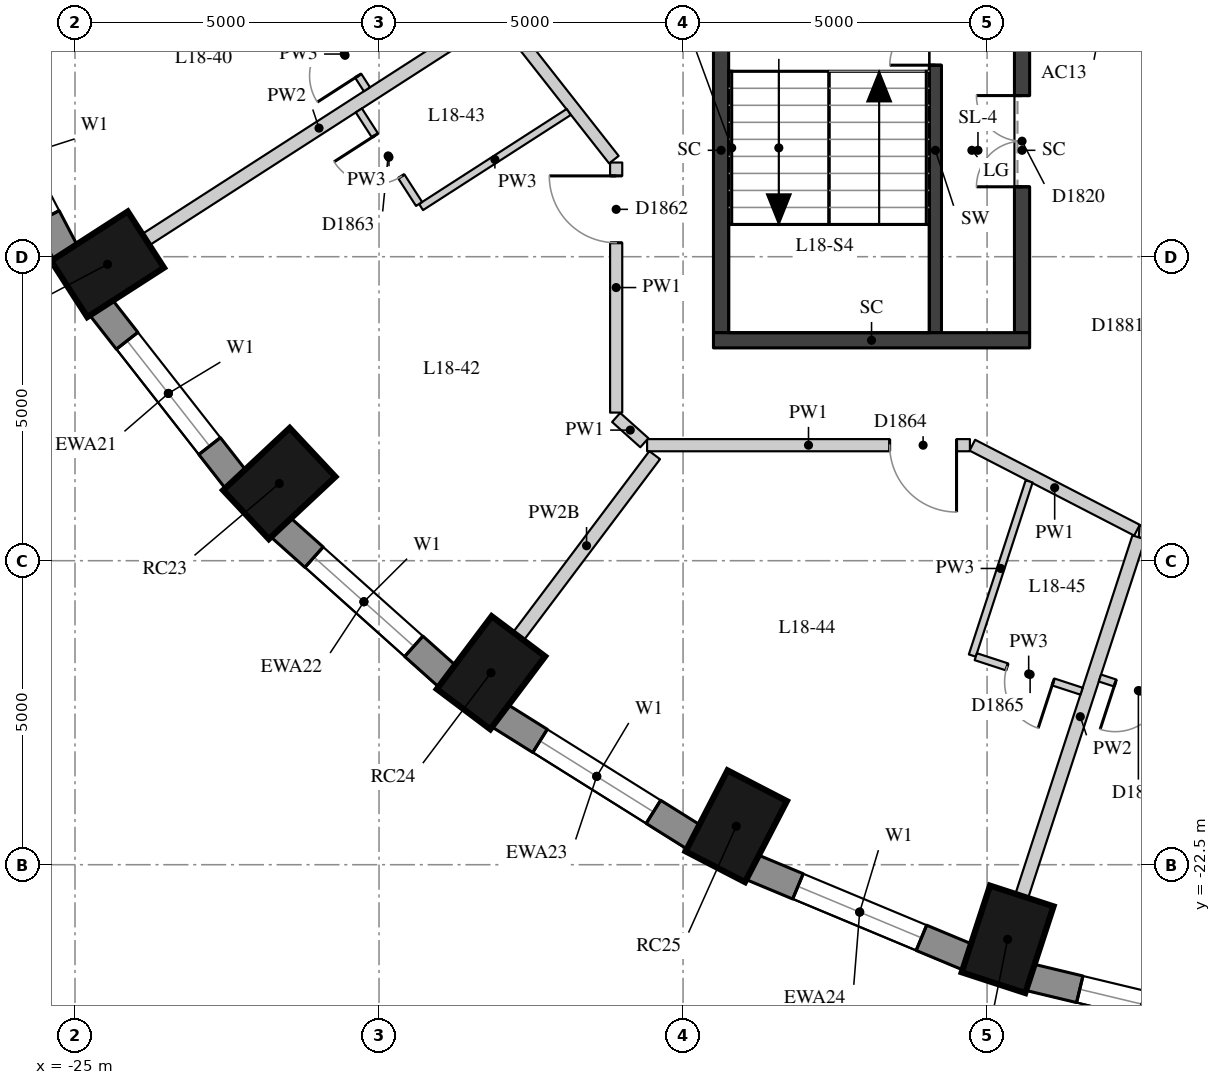
"""IFC4 building model, lengths in metres.
Left out: names, types, materials, properties, quantities, classifications, styles, units other than length and angle.
Written with IfcOpenShell. Run it as: python <this file> out.ifc"""

import sys

from ifc_helpers import new_model, si_unit, direction, frame, frame_2d, origin, origin_2d, place, context, subcontext, project, spatial, rectangle, extrude, element, fill, save


model = new_model("IFC4")
c1 = context("Model", 3, precision=1e-05, world=origin(), true_north=direction((0.0, 1.0)))
c2 = subcontext(c1, "Body", "Model", "MODEL_VIEW")
j1 = project(units=[si_unit("LENGTHUNIT", "METRE"), si_unit("PLANEANGLEUNIT", "RADIAN")], contexts=[c1])
p1 = place(None, origin())
s1 = spatial("IfcSite", under=j1, at=p1, CompositionType="ELEMENT")
p2 = place(p1, origin())
s2 = spatial("IfcBuilding", under=s1, at=p2, CompositionType="ELEMENT")
p3 = place(p2, frame((0.0, 0.0, 67.9)))
s3 = spatial("IfcBuildingStorey", under=s2, at=p3, CompositionType="ELEMENT", Elevation=67.9)
for number, where, z_axis, x_axis in (
    (1, (-24.465, -12.625, 0.0), (0.0, 0.0, 1.0), (-0.841, -0.541, 0.0)),
    (2, (-21.641, -16.23, 0.0), (0.0, 0.0, 1.0), (-0.73, -0.683, 0.0)),
    (3, (-18.159, -19.343, 0.0), (0.0, 0.0, 1.0), (-0.601, -0.799, 0.0)),
    (4, (-14.125, -21.867, 0.0), (0.0, 0.0, 1.0), (-0.46, -0.888, 0.0)),
    (5, (-9.662, -23.727, 0.0), (0.0, 0.0, 1.0), (-0.31, -0.951, 0.0)),
):
    element("IfcColumn", number, at=place(p3, frame(where, z_axis=z_axis, x_axis=x_axis)), inside=s3, PredefinedType="COLUMN", context=c2, shape_type="SweptSolid", body=[
        extrude(rectangle(XDim=1.5, YDim=1.1, at=origin_2d()), origin(), (0.0, 0.0, 1.0), 3.3),
    ])
p4 = place(p3, frame((-26.786, -9.305, 0.0), z_axis=(0.0, 0.0, 1.0), x_axis=(0.462492775226, -0.886623050041, 0.0)))
e6 = element("IfcWall", 6, at=p4, inside=s3, PredefinedType="SOLIDWALL", context=c2, shape_type="SweptSolid", body=[
    extrude(rectangle(XDim=3.532, YDim=0.45, at=frame_2d((1.766, 0.0))), origin(), (0.0, 0.0, 1.0), 3.02),
])
p5 = place(p4, frame((0.666, 0.0, 0.4)))
e7 = element("IfcOpeningElement", 7, at=p5, cuts=e6, PredefinedType="OPENING", context=c2, shape_type="SweptSolid", body=[
    extrude(rectangle(XDim=2.2, YDim=1.75, at=frame_2d((1.1, 0.875))), frame((0.0, 0.235, 0.0), z_axis=(0.0, -1.0, 0.0), x_axis=(1.0, 0.0, 0.0)), (0.0, 0.0, 1.0), 0.47),
])
p6 = place(p3, frame((-24.578, -13.328, 0.0), z_axis=(0.0, 0.0, 1.0), x_axis=(0.616661975264, -0.787228053529, 0.0)))
e8 = element("IfcWall", 8, at=p6, inside=s3, PredefinedType="SOLIDWALL", context=c2, shape_type="SweptSolid", body=[
    extrude(rectangle(XDim=3.61, YDim=0.45, at=frame_2d((1.805, 0.0))), origin(), (0.0, 0.0, 1.0), 3.02),
])
p7 = place(p6, frame((0.705, 0.0, 0.4)))
e9 = element("IfcOpeningElement", 9, at=p7, cuts=e8, PredefinedType="OPENING", context=c2, shape_type="SweptSolid", body=[
    extrude(rectangle(XDim=2.2, YDim=1.75, at=frame_2d((1.1, 0.875))), frame((0.0, 0.235, 0.0), z_axis=(0.0, -1.0, 0.0), x_axis=(1.0, 0.0, 0.0)), (0.0, 0.0, 1.0), 0.47),
])
p8 = place(p3, frame((-21.627, -16.943, 0.0), z_axis=(0.0, 0.0, 1.0), x_axis=(0.745526233716, -0.66647628228, 0.0)))
e10 = element("IfcWall", 10, at=p8, inside=s3, PredefinedType="SOLIDWALL", context=c2, shape_type="SweptSolid", body=[
    extrude(rectangle(XDim=3.697, YDim=0.45, at=frame_2d((1.848, 0.0))), origin(), (0.0, 0.0, 1.0), 3.02),
])
p9 = place(p8, frame((0.749, 0.0, 0.4)))
e11 = element("IfcOpeningElement", 11, at=p9, cuts=e10, PredefinedType="OPENING", context=c2, shape_type="SweptSolid", body=[
    extrude(rectangle(XDim=2.2, YDim=1.75, at=frame_2d((1.1, 0.875))), frame((0.0, 0.235, 0.0), z_axis=(0.0, -1.0, 0.0), x_axis=(1.0, 0.0, 0.0)), (0.0, 0.0, 1.0), 0.47),
])
p10 = place(p3, frame((-18.023, -20.044, 0.0), z_axis=(0.0, 0.0, 1.0), x_axis=(0.847635480093, -0.530579016629, 0.0)))
e12 = element("IfcWall", 12, at=p10, inside=s3, PredefinedType="SOLIDWALL", context=c2, shape_type="SweptSolid", body=[
    extrude(rectangle(XDim=3.782, YDim=0.45, at=frame_2d((1.891, 0.0))), origin(), (0.0, 0.0, 1.0), 3.02),
])
p11 = place(p10, frame((0.791, 0.0, 0.4)))
e13 = element("IfcOpeningElement", 13, at=p11, cuts=e12, PredefinedType="OPENING", context=c2, shape_type="SweptSolid", body=[
    extrude(rectangle(XDim=2.2, YDim=1.75, at=frame_2d((1.1, 0.875))), frame((0.0, 0.235, 0.0), z_axis=(0.0, -1.0, 0.0), x_axis=(1.0, 0.0, 0.0)), (0.0, 0.0, 1.0), 0.47),
])
p12 = place(p3, frame((-13.875, -22.537, 0.0), z_axis=(0.0, 0.0, 1.0), x_axis=(0.923031964282, -0.384723267966, 0.0)))
e14 = element("IfcWall", 14, at=p12, inside=s3, PredefinedType="SOLIDWALL", context=c2, shape_type="SweptSolid", body=[
    extrude(rectangle(XDim=3.856, YDim=0.45, at=frame_2d((1.928, 0.0))), origin(), (0.0, 0.0, 1.0), 3.02),
])
p13 = place(p12, frame((0.828, 0.0, 0.4)))
e15 = element("IfcOpeningElement", 15, at=p13, cuts=e14, PredefinedType="OPENING", context=c2, shape_type="SweptSolid", body=[
    extrude(rectangle(XDim=2.2, YDim=1.75, at=frame_2d((1.1, 0.875))), frame((0.0, 0.235, 0.0), z_axis=(0.0, -1.0, 0.0), x_axis=(1.0, 0.0, 0.0)), (0.0, 0.0, 1.0), 0.47),
])
p14 = place(p3, frame((-9.308, -24.35, 0.0), z_axis=(0.0, 0.0, 1.0), x_axis=(0.972496561493, -0.232917233979, 0.0)))
e16 = element("IfcWall", 16, at=p14, inside=s3, PredefinedType="SOLIDWALL", context=c2, shape_type="SweptSolid", body=[
    extrude(rectangle(XDim=3.911, YDim=0.45, at=frame_2d((1.956, 0.0))), origin(), (0.0, 0.0, 1.0), 3.02),
])
p15 = place(p14, frame((0.855, 0.0, 0.4)))
e17 = element("IfcOpeningElement", 17, at=p15, cuts=e16, PredefinedType="OPENING", context=c2, shape_type="SweptSolid", body=[
    extrude(rectangle(XDim=2.2, YDim=1.75, at=frame_2d((1.1, 0.875))), frame((0.0, 0.235, 0.0), z_axis=(0.0, -1.0, 0.0), x_axis=(1.0, 0.0, 0.0)), (0.0, 0.0, 1.0), 0.47),
])
p16 = place(p3, frame((-10.85, -13.75, 0.0), z_axis=(0.0, 0.0, 1.0), x_axis=(0.0, 1.0, 0.0)))
e18 = element("IfcWall", 18, at=p16, inside=s3, PredefinedType="SHEAR", context=c2, shape_type="SweptSolid", body=[
    extrude(rectangle(XDim=6.0, YDim=0.2, at=frame_2d((3.0, 0.0))), origin(), (0.0, 0.0, 1.0), 3.02),
])
p17 = place(p16, frame((4.4, 0.0, 0.0)))
e19 = element("IfcOpeningElement", 19, at=p17, cuts=e18, PredefinedType="OPENING", context=c2, shape_type="SweptSolid", body=[
    extrude(rectangle(XDim=1.5, YDim=2.1, at=frame_2d((0.75, 1.05))), frame((0.0, 0.11, 0.0), z_axis=(0.0, -1.0, 0.0), x_axis=(1.0, 0.0, 0.0)), (0.0, 0.0, 1.0), 0.22),
])
p18 = place(p3, frame((-14.375, -13.75, -0.28), z_axis=(0.0, 0.0, 1.0), x_axis=(0.0, 1.0, 0.0)))
e20 = element("IfcWall", 20, at=p18, inside=s3, PredefinedType="SHEAR", context=c2, shape_type="SweptSolid", body=[
    extrude(rectangle(XDim=6.0, YDim=0.25, at=frame_2d((3.0, 0.0))), origin(), (0.0, 0.0, 1.0), 3.3),
])
p19 = place(p3, frame((-9.425, -13.75, -0.28), z_axis=(0.0, 0.0, 1.0), x_axis=(0.0, 1.0, 0.0)))
e21 = element("IfcWall", 21, at=p19, inside=s3, PredefinedType="SHEAR", context=c2, shape_type="SweptSolid", body=[
    extrude(rectangle(XDim=6.0, YDim=0.25, at=frame_2d((3.0, 0.0))), origin(), (0.0, 0.0, 1.0), 3.3),
])
p20 = place(p19, frame((2.4, 0.0, 0.28)))
e22 = element("IfcOpeningElement", 22, at=p20, cuts=e21, PredefinedType="OPENING", context=c2, shape_type="SweptSolid", body=[
    extrude(rectangle(XDim=1.5, YDim=2.1, at=frame_2d((0.75, 1.05))), frame((0.0, 0.135, 0.0), z_axis=(0.0, -1.0, 0.0), x_axis=(1.0, 0.0, 0.0)), (0.0, 0.0, 1.0), 0.27),
])
p21 = place(p3, frame((-14.5, -13.875, -0.28), z_axis=(0.0, 0.0, 1.0), x_axis=(1.0, 0.0, 0.0)))
e23 = element("IfcWall", 23, at=p21, inside=s3, PredefinedType="SHEAR", context=c2, shape_type="SweptSolid", body=[
    extrude(rectangle(XDim=5.2, YDim=0.25, at=frame_2d((2.6, 0.0))), origin(), (0.0, 0.0, 1.0), 3.3),
])
p22 = place(p3, frame((3.778, -17.898, 0.0), z_axis=(0.0, 0.0, 1.0), x_axis=(-0.996963005503, 0.077876605336, 0.0)))
e24 = element("IfcWall", 24, at=p22, inside=s3, PredefinedType="PARTITIONING", context=c2, shape_type="SweptSolid", body=[
    extrude(rectangle(XDim=11.311, YDim=0.2, at=frame_2d((5.656, 0.0))), origin(), (0.0, 0.0, 1.0), 3.02),
])
p23 = place(p22, frame((8.33, 0.0, 0.0)))
e25 = element("IfcOpeningElement", 25, at=p23, cuts=e24, PredefinedType="OPENING", context=c2, shape_type="SweptSolid", body=[
    extrude(rectangle(XDim=1.0, YDim=2.1, at=frame_2d((0.5, 1.05))), frame((0.0, 0.11, 0.0), z_axis=(0.0, -1.0, 0.0), x_axis=(1.0, 0.0, 0.0)), (0.0, 0.0, 1.0), 0.22),
])
p24 = place(p22, frame((5.77, 0.0, 0.0)))
e26 = element("IfcOpeningElement", 26, at=p24, cuts=e24, PredefinedType="OPENING", context=c2, shape_type="SweptSolid", body=[
    extrude(rectangle(XDim=1.0, YDim=2.1, at=frame_2d((0.5, 1.05))), frame((0.0, 0.11, 0.0), z_axis=(0.0, -1.0, 0.0), x_axis=(1.0, 0.0, 0.0)), (0.0, 0.0, 1.0), 0.22),
])
p25 = place(p22, frame((1.45, 0.0, 0.0)))
e27 = element("IfcOpeningElement", 27, at=p25, cuts=e24, PredefinedType="OPENING", context=c2, shape_type="SweptSolid", body=[
    extrude(rectangle(XDim=0.9, YDim=2.1, at=frame_2d((0.45, 1.05))), frame((0.0, 0.11, 0.0), z_axis=(0.0, -1.0, 0.0), x_axis=(1.0, 0.0, 0.0)), (0.0, 0.0, 1.0), 0.22),
])
p26 = place(p3, frame((-7.534, -16.998, 0.0), z_axis=(0.0, 0.0, 1.0), x_axis=(-0.888535328052, 0.458808206992, 0.0)))
e28 = element("IfcWall", 28, at=p26, inside=s3, PredefinedType="PARTITIONING", context=c2, shape_type="SweptSolid", body=[
    extrude(rectangle(XDim=3.047, YDim=0.2, at=frame_2d((1.524, 0.0))), origin(), (0.0, 0.0, 1.0), 3.02),
])
p27 = place(p3, frame((-10.282, -15.6, 0.0), z_axis=(0.0, 0.0, 1.0), x_axis=(-1.0, 0.0, 0.0)))
e29 = element("IfcWall", 29, at=p27, inside=s3, PredefinedType="PARTITIONING", context=c2, shape_type="SweptSolid", body=[
    extrude(rectangle(XDim=5.309, YDim=0.2, at=frame_2d((2.655, 0.0))), origin(), (0.0, 0.0, 1.0), 3.02),
])
p28 = place(p27, frame((0.22, 0.0, 0.0)))
e30 = element("IfcOpeningElement", 30, at=p28, cuts=e29, PredefinedType="OPENING", context=c2, shape_type="SweptSolid", body=[
    extrude(rectangle(XDim=1.1, YDim=2.1, at=frame_2d((0.55, 1.05))), frame((0.0, 0.11, 0.0), z_axis=(0.0, -1.0, 0.0), x_axis=(1.0, 0.0, 0.0)), (0.0, 0.0, 1.0), 0.22),
])
p29 = place(p3, frame((-15.636, -15.56, 0.0), z_axis=(0.0, 0.0, 1.0), x_axis=(-0.744656758283, 0.667447610187, 0.0)))
e31 = element("IfcWall", 31, at=p29, inside=s3, PredefinedType="PARTITIONING", context=c2, shape_type="SweptSolid", body=[
    extrude(rectangle(XDim=0.623, YDim=0.2, at=frame_2d((0.312, 0.0))), origin(), (0.0, 0.0, 1.0), 3.02),
])
p30 = place(p3, frame((-16.1, -15.064, 0.0), z_axis=(0.0, 0.0, 1.0), x_axis=(0.0, 1.0, 0.0)))
e32 = element("IfcWall", 32, at=p30, inside=s3, PredefinedType="PARTITIONING", context=c2, shape_type="SweptSolid", body=[
    extrude(rectangle(XDim=4.113, YDim=0.2, at=frame_2d((2.057, 0.0))), origin(), (0.0, 0.0, 1.0), 3.02),
])
p31 = place(p30, frame((2.793, 0.0, 0.0)))
e33 = element("IfcOpeningElement", 33, at=p31, cuts=e32, PredefinedType="OPENING", context=c2, shape_type="SweptSolid", body=[
    extrude(rectangle(XDim=1.1, YDim=2.1, at=frame_2d((0.55, 1.05))), frame((0.0, 0.11, 0.0), z_axis=(0.0, -1.0, 0.0), x_axis=(1.0, 0.0, 0.0)), (0.0, 0.0, 1.0), 0.22),
])
p32 = place(p3, frame((-16.137, -10.904, 0.0), z_axis=(0.0, 0.0, 1.0), x_axis=(-0.617888403737, 0.786265807808, 0.0)))
e34 = element("IfcWall", 34, at=p32, inside=s3, PredefinedType="PARTITIONING", context=c2, shape_type="SweptSolid", body=[
    extrude(rectangle(XDim=6.29, YDim=0.2, at=frame_2d((3.145, 0.0))), origin(), (0.0, 0.0, 1.0), 3.02),
])
p33 = place(p32, frame((5.07, 0.0, 0.0)))
e35 = element("IfcOpeningElement", 35, at=p33, cuts=e34, PredefinedType="OPENING", context=c2, shape_type="SweptSolid", body=[
    extrude(rectangle(XDim=1.0, YDim=2.1, at=frame_2d((0.5, 1.05))), frame((0.0, 0.11, 0.0), z_axis=(0.0, -1.0, 0.0), x_axis=(1.0, 0.0, 0.0)), (0.0, 0.0, 1.0), 0.22),
])
p34 = place(p3, frame((-23.835, -12.219, 0.0), z_axis=(0.0, 0.0, 1.0), x_axis=(0.840749666863, 0.541424046076, 0.0)))
e36 = element("IfcWall", 36, at=p34, inside=s3, PredefinedType="PARTITIONING", context=c2, shape_type="SweptSolid", body=[
    extrude(rectangle(XDim=6.775, YDim=0.22, at=frame_2d((3.387, 0.0))), origin(), (0.0, 0.0, 1.0), 3.02),
])
p35 = place(p3, frame((-17.708, -18.743, 0.0), z_axis=(0.0, 0.0, 1.0), x_axis=(0.601172757903, 0.799119086967, 0.0)))
e37 = element("IfcWall", 37, at=p35, inside=s3, PredefinedType="PARTITIONING", context=c2, shape_type="SweptSolid", body=[
    extrude(rectangle(XDim=3.729, YDim=0.22, at=frame_2d((1.864, 0.0))), origin(), (0.0, 0.0, 1.0), 2.57),
])
p36 = place(p3, frame((-9.429, -23.014, 0.0), z_axis=(0.0, 0.0, 1.0), x_axis=(0.310235573501, 0.950659712481, 0.0)))
e38 = element("IfcWall", 38, at=p36, inside=s3, PredefinedType="PARTITIONING", context=c2, shape_type="SweptSolid", body=[
    extrude(rectangle(XDim=6.204, YDim=0.22, at=frame_2d((3.102, 0.0))), origin(), (0.0, 0.0, 1.0), 3.02),
])
p37 = place(p3, frame((-16.881, -10.12, 0.0), z_axis=(0.0, 0.0, 1.0), x_axis=(-0.840749755927, -0.541423907773, 0.0)))
e39 = element("IfcWall", 39, at=p37, inside=s3, PredefinedType="PARTITIONING", context=c2, shape_type="SweptSolid", body=[
    extrude(rectangle(XDim=2.888, YDim=0.12, at=frame_2d((1.444, 0.0))), origin(), (0.0, 0.0, 1.0), 3.02),
])
p38 = place(p3, frame((-9.308, -16.195, 0.0), z_axis=(0.0, 0.0, 1.0), x_axis=(-0.310170219214, -0.950681037527, 0.0)))
e40 = element("IfcWall", 40, at=p38, inside=s3, PredefinedType="PARTITIONING", context=c2, shape_type="SweptSolid", body=[
    extrude(rectangle(XDim=3.014, YDim=0.12, at=frame_2d((1.507, 0.0))), origin(), (0.0, 0.0, 1.0), 3.02),
])
p39 = place(p3, frame((-20.946, -8.587, 0.0), z_axis=(0.0, 0.0, 1.0), x_axis=(0.541526323973, -0.840683793375, 0.0)))
e41 = element("IfcWall", 41, at=p39, inside=s3, PredefinedType="PARTITIONING", context=c2, shape_type="SweptSolid", body=[
    extrude(rectangle(XDim=1.38, YDim=0.12, at=frame_2d((0.69, 0.0))), origin(), (0.0, 0.0, 1.0), 3.02),
])
p40 = place(p39, frame((0.315, 0.0, 0.0)))
e42 = element("IfcOpeningElement", 42, at=p40, cuts=e41, PredefinedType="OPENING", context=c2, shape_type="SweptSolid", body=[
    extrude(rectangle(XDim=0.8, YDim=2.1, at=frame_2d((0.4, 1.05))), frame((0.0, 0.07, 0.0), z_axis=(0.0, -1.0, 0.0), x_axis=(1.0, 0.0, 0.0)), (0.0, 0.0, 1.0), 0.14),
])
p41 = place(p3, frame((-19.341, -11.633, 0.0), z_axis=(0.0, 0.0, 1.0), x_axis=(-0.541391271501, 0.840770772055, 0.0)))
e43 = element("IfcWall", 43, at=p41, inside=s3, PredefinedType="PARTITIONING", context=c2, shape_type="SweptSolid", body=[
    extrude(rectangle(XDim=1.83, YDim=0.12, at=frame_2d((0.915, 0.0))), origin(), (0.0, 0.0, 1.0), 3.02),
])
p42 = place(p41, frame((0.54, 0.0, 0.0)))
e44 = element("IfcOpeningElement", 44, at=p42, cuts=e43, PredefinedType="OPENING", context=c2, shape_type="SweptSolid", body=[
    extrude(rectangle(XDim=0.8, YDim=2.1, at=frame_2d((0.4, 1.05))), frame((0.0, 0.07, 0.0), z_axis=(0.0, -1.0, 0.0), x_axis=(1.0, 0.0, 0.0)), (0.0, 0.0, 1.0), 0.14),
])
p43 = place(p3, frame((-10.186, -19.079, 0.0), z_axis=(0.0, 0.0, 1.0), x_axis=(0.950678536911, -0.31017788357, 0.0)))
e45 = element("IfcWall", 45, at=p43, inside=s3, PredefinedType="PARTITIONING", context=c2, shape_type="SweptSolid", body=[
    extrude(rectangle(XDim=1.83, YDim=0.12, at=frame_2d((0.915, 0.0))), origin(), (0.0, 0.0, 1.0), 3.02),
])
p44 = place(p43, frame((0.54, 0.0, 0.0)))
e46 = element("IfcOpeningElement", 46, at=p44, cuts=e45, PredefinedType="OPENING", context=c2, shape_type="SweptSolid", body=[
    extrude(rectangle(XDim=0.8, YDim=2.1, at=frame_2d((0.4, 1.05))), frame((0.0, 0.07, 0.0), z_axis=(0.0, -1.0, 0.0), x_axis=(1.0, 0.0, 0.0)), (0.0, 0.0, 1.0), 0.14),
])
p45 = place(p3, frame((-6.832, -19.858, 0.0), z_axis=(0.0, 0.0, 1.0), x_axis=(-0.950645927723, 0.31027781117, 0.0)))
e47 = element("IfcWall", 47, at=p45, inside=s3, PredefinedType="PARTITIONING", context=c2, shape_type="SweptSolid", body=[
    extrude(rectangle(XDim=1.38, YDim=0.12, at=frame_2d((0.69, 0.0))), origin(), (0.0, 0.0, 1.0), 3.02),
])
p46 = place(p45, frame((0.315, 0.0, 0.0)))
e48 = element("IfcOpeningElement", 48, at=p46, cuts=e47, PredefinedType="OPENING", context=c2, shape_type="SweptSolid", body=[
    extrude(rectangle(XDim=0.8, YDim=2.1, at=frame_2d((0.4, 1.05))), frame((0.0, 0.07, 0.0), z_axis=(0.0, -1.0, 0.0), x_axis=(1.0, 0.0, 0.0)), (0.0, 0.0, 1.0), 0.14),
])
p47 = place(p7, origin())
e49 = element("IfcWindow", 49, at=p47, inside=s3, PartitioningType="SINGLE_PANEL", PredefinedType="WINDOW", context=c2, shape_type="SweptSolid", body=[
    extrude(rectangle(XDim=2.2, YDim=1.75, at=frame_2d((1.1, 0.875))), frame((0.0, 0.035, 0.0), z_axis=(0.0, -1.0, 0.0), x_axis=(1.0, 0.0, 0.0)), (0.0, 0.0, 1.0), 0.06),
])
fill(e9, e49)
p48 = place(p9, origin())
e50 = element("IfcWindow", 50, at=p48, inside=s3, PartitioningType="SINGLE_PANEL", PredefinedType="WINDOW", context=c2, shape_type="SweptSolid", body=[
    extrude(rectangle(XDim=2.2, YDim=1.75, at=frame_2d((1.1, 0.875))), frame((0.0, 0.035, 0.0), z_axis=(0.0, -1.0, 0.0), x_axis=(1.0, 0.0, 0.0)), (0.0, 0.0, 1.0), 0.06),
])
fill(e11, e50)
p49 = place(p11, origin())
e51 = element("IfcWindow", 51, at=p49, inside=s3, PartitioningType="SINGLE_PANEL", PredefinedType="WINDOW", context=c2, shape_type="SweptSolid", body=[
    extrude(rectangle(XDim=2.2, YDim=1.75, at=frame_2d((1.1, 0.875))), frame((0.0, 0.035, 0.0), z_axis=(0.0, -1.0, 0.0), x_axis=(1.0, 0.0, 0.0)), (0.0, 0.0, 1.0), 0.06),
])
fill(e13, e51)
p50 = place(p13, origin())
e52 = element("IfcWindow", 52, at=p50, inside=s3, PartitioningType="SINGLE_PANEL", PredefinedType="WINDOW", context=c2, shape_type="SweptSolid", body=[
    extrude(rectangle(XDim=2.2, YDim=1.75, at=frame_2d((1.1, 0.875))), frame((0.0, 0.035, 0.0), z_axis=(0.0, -1.0, 0.0), x_axis=(1.0, 0.0, 0.0)), (0.0, 0.0, 1.0), 0.06),
])
fill(e15, e52)
p51 = place(p15, origin())
e53 = element("IfcWindow", 53, at=p51, inside=s3, PartitioningType="SINGLE_PANEL", PredefinedType="WINDOW", context=c2, shape_type="SweptSolid", body=[
    extrude(rectangle(XDim=2.2, YDim=1.75, at=frame_2d((1.1, 0.875))), frame((0.0, 0.035, 0.0), z_axis=(0.0, -1.0, 0.0), x_axis=(1.0, 0.0, 0.0)), (0.0, 0.0, 1.0), 0.06),
])
fill(e17, e53)
p52 = place(p17, origin())
e54 = element("IfcDoor", 54, at=p52, inside=s3, OperationType="DOUBLE_DOOR_SINGLE_SWING", PredefinedType="DOOR", context=c2, shape_type="SweptSolid", body=[
    extrude(rectangle(XDim=1.5, YDim=2.1, at=frame_2d((0.75, 1.05))), frame((0.0, 0.025, 0.0), z_axis=(0.0, -1.0, 0.0), x_axis=(1.0, 0.0, 0.0)), (0.0, 0.0, 1.0), 0.05),
])
fill(e19, e54)
p53 = place(p20, origin())
e55 = element("IfcDoor", 55, at=p53, inside=s3, OperationType="DOUBLE_DOOR_SINGLE_SWING", PredefinedType="DOOR", context=c2, shape_type="SweptSolid", body=[
    extrude(rectangle(XDim=1.5, YDim=2.1, at=frame_2d((0.75, 1.05))), frame((0.0, 0.025, 0.0), z_axis=(0.0, -1.0, 0.0), x_axis=(1.0, 0.0, 0.0)), (0.0, 0.0, 1.0), 0.05),
])
fill(e22, e55)
p54 = place(p40, origin())
e56 = element("IfcDoor", 56, at=p54, inside=s3, OperationType="SINGLE_SWING_LEFT", PredefinedType="DOOR", context=c2, shape_type="SweptSolid", body=[
    extrude(rectangle(XDim=0.8, YDim=2.1, at=frame_2d((0.4, 1.05))), frame((0.0, 0.025, 0.0), z_axis=(0.0, -1.0, 0.0), x_axis=(1.0, 0.0, 0.0)), (0.0, 0.0, 1.0), 0.05),
])
fill(e42, e56)
p55 = place(p31, origin())
e57 = element("IfcDoor", 57, at=p55, inside=s3, OperationType="SINGLE_SWING_RIGHT", PredefinedType="DOOR", context=c2, shape_type="SweptSolid", body=[
    extrude(rectangle(XDim=1.1, YDim=2.1, at=frame_2d((0.55, 1.05))), frame((0.0, 0.025, 0.0), z_axis=(0.0, -1.0, 0.0), x_axis=(1.0, 0.0, 0.0)), (0.0, 0.0, 1.0), 0.05),
])
fill(e33, e57)
p56 = place(p42, origin())
e58 = element("IfcDoor", 58, at=p56, inside=s3, OperationType="SINGLE_SWING_RIGHT", PredefinedType="DOOR", context=c2, shape_type="SweptSolid", body=[
    extrude(rectangle(XDim=0.8, YDim=2.1, at=frame_2d((0.4, 1.05))), frame((0.0, 0.025, 0.0), z_axis=(0.0, -1.0, 0.0), x_axis=(1.0, 0.0, 0.0)), (0.0, 0.0, 1.0), 0.05),
])
fill(e44, e58)
p57 = place(p28, origin())
e59 = element("IfcDoor", 59, at=p57, inside=s3, OperationType="SINGLE_SWING_LEFT", PredefinedType="DOOR", context=c2, shape_type="SweptSolid", body=[
    extrude(rectangle(XDim=1.1, YDim=2.1, at=frame_2d((0.55, 1.05))), frame((0.0, 0.025, 0.0), z_axis=(0.0, -1.0, 0.0), x_axis=(1.0, 0.0, 0.0)), (0.0, 0.0, 1.0), 0.05),
])
fill(e30, e59)
p58 = place(p44, origin())
e60 = element("IfcDoor", 60, at=p58, inside=s3, OperationType="SINGLE_SWING_LEFT", PredefinedType="DOOR", context=c2, shape_type="SweptSolid", body=[
    extrude(rectangle(XDim=0.8, YDim=2.1, at=frame_2d((0.4, 1.05))), frame((0.0, 0.025, 0.0), z_axis=(0.0, -1.0, 0.0), x_axis=(1.0, 0.0, 0.0)), (0.0, 0.0, 1.0), 0.05),
])
fill(e46, e60)
p59 = place(p46, origin())
e61 = element("IfcDoor", 61, at=p59, inside=s3, OperationType="SINGLE_SWING_RIGHT", PredefinedType="DOOR", context=c2, shape_type="SweptSolid", body=[
    extrude(rectangle(XDim=0.8, YDim=2.1, at=frame_2d((0.4, 1.05))), frame((0.0, 0.025, 0.0), z_axis=(0.0, -1.0, 0.0), x_axis=(1.0, 0.0, 0.0)), (0.0, 0.0, 1.0), 0.05),
])
fill(e48, e61)
save(model, sys.argv[1])
